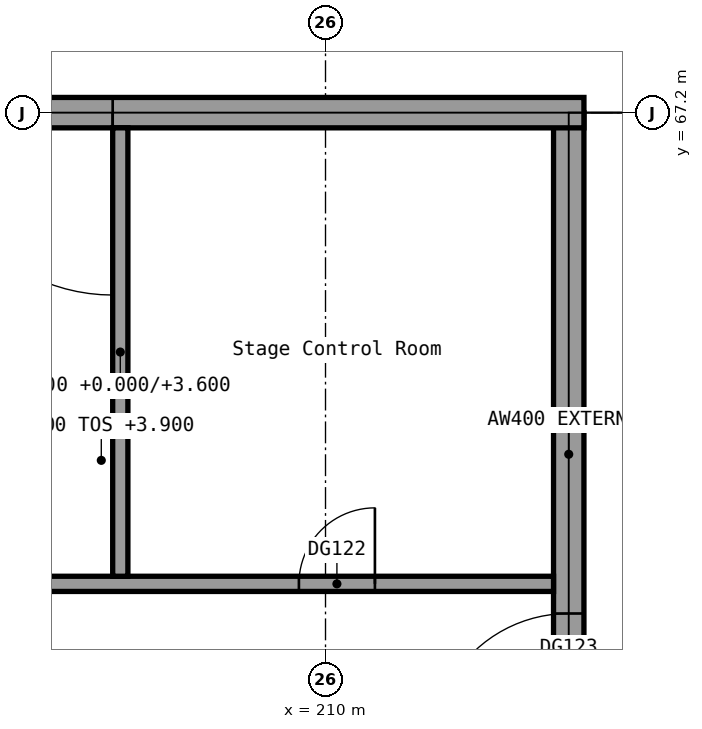
"""IFC4 building model, lengths in metres.
Left out: names, types, materials, properties, quantities, classifications, styles, units other than length and angle.
Written with IfcOpenShell. Run it as: python <this file> out.ifc"""

import sys

from ifc_helpers import new_model, si_unit, direction, frame, frame_2d, origin, place, context, subcontext, project, spatial, rectangle, extrude, element, fill, save


model = new_model("IFC4")
c1 = context("Model", 3, precision=1e-05, world=origin(), true_north=direction((0.0, 1.0)))
c2 = subcontext(c1, "Body", "Model", "MODEL_VIEW")
j1 = project(units=[si_unit("LENGTHUNIT", "METRE"), si_unit("PLANEANGLEUNIT", "RADIAN")], contexts=[c1])
p1 = place(None, origin())
s1 = spatial("IfcSite", under=j1, at=p1, CompositionType="ELEMENT")
p2 = place(p1, origin())
s2 = spatial("IfcBuilding", under=s1, at=p2, CompositionType="ELEMENT")
p3 = place(p2, origin())
s3 = spatial("IfcBuildingStorey", under=s2, at=p3, CompositionType="ELEMENT", Elevation=0.0)
p4 = place(p3, frame((213.2, 58.21, 0.0), z_axis=(0.0, 0.0, 1.0), x_axis=(0.0, 1.0, 0.0)))
e1 = element("IfcWall", 1, at=p4, inside=s3, PredefinedType="SHEAR", context=c2, shape_type="SweptSolid", body=[
    extrude(rectangle(XDim=8.99, YDim=0.4, at=frame_2d((4.495, 0.0))), origin(), (0.0, 0.0, 1.0), 6.0),
])
p5 = place(p4, frame((0.6, 0.0, 0.0)))
e2 = element("IfcOpeningElement", 2, at=p5, cuts=e1, PredefinedType="OPENING", context=c2, shape_type="SweptSolid", body=[
    extrude(rectangle(XDim=1.8, YDim=2.1, at=frame_2d((0.9, 1.05))), frame((0.0, 0.2, 0.0), z_axis=(0.0, -1.0, 0.0), x_axis=(1.0, 0.0, 0.0)), (0.0, 0.0, 1.0), 0.4),
])
p6 = place(p3, frame((213.4, 67.2, 0.0), z_axis=(0.0, 0.0, 1.0), x_axis=(-1.0, 0.0, 0.0)))
e3 = element("IfcWall", 3, at=p6, inside=s3, PredefinedType="SHEAR", context=c2, shape_type="SweptSolid", body=[
    extrude(rectangle(XDim=23.6, YDim=0.4, at=frame_2d((11.8, 0.0))), origin(), (0.0, 0.0, 1.0), 6.0),
])
p7 = place(p6, frame((6.2, 0.0, 0.0)))
e4 = element("IfcOpeningElement", 4, at=p7, cuts=e3, PredefinedType="OPENING", context=c2, shape_type="SweptSolid", body=[
    extrude(rectangle(XDim=2.4, YDim=2.4, at=frame_2d((1.2, 1.2))), frame((0.0, 0.2, 0.0), z_axis=(0.0, -1.0, 0.0), x_axis=(1.0, 0.0, 0.0)), (0.0, 0.0, 1.0), 0.4),
])
p8 = place(p3, frame((190.2, 61.0, 0.0), z_axis=(0.0, 0.0, 1.0), x_axis=(1.0, 0.0, 0.0)))
e5 = element("IfcWall", 5, at=p8, inside=s3, PredefinedType="SOLIDWALL", context=c2, shape_type="SweptSolid", body=[
    extrude(rectangle(XDim=22.8, YDim=0.2, at=frame_2d((11.4, 0.0))), origin(), (0.0, 0.0, 1.0), 3.6),
])
p9 = place(p8, frame((2.35, 0.0, 0.0)))
e6 = element("IfcOpeningElement", 6, at=p9, cuts=e5, PredefinedType="OPENING", context=c2, shape_type="SweptSolid", body=[
    extrude(rectangle(XDim=1.0, YDim=2.1, at=frame_2d((0.5, 1.05))), frame((0.0, 0.1, 0.0), z_axis=(0.0, -1.0, 0.0), x_axis=(1.0, 0.0, 0.0)), (0.0, 0.0, 1.0), 0.2),
])
p10 = place(p8, frame((8.05, 0.0, 0.0)))
e7 = element("IfcOpeningElement", 7, at=p10, cuts=e5, PredefinedType="OPENING", context=c2, shape_type="SweptSolid", body=[
    extrude(rectangle(XDim=1.0, YDim=2.1, at=frame_2d((0.5, 1.05))), frame((0.0, 0.1, 0.0), z_axis=(0.0, -1.0, 0.0), x_axis=(1.0, 0.0, 0.0)), (0.0, 0.0, 1.0), 0.2),
])
p11 = place(p8, frame((13.75, 0.0, 0.0)))
e8 = element("IfcOpeningElement", 8, at=p11, cuts=e5, PredefinedType="OPENING", context=c2, shape_type="SweptSolid", body=[
    extrude(rectangle(XDim=1.0, YDim=2.1, at=frame_2d((0.5, 1.05))), frame((0.0, 0.1, 0.0), z_axis=(0.0, -1.0, 0.0), x_axis=(1.0, 0.0, 0.0)), (0.0, 0.0, 1.0), 0.2),
])
p12 = place(p8, frame((19.45, 0.0, 0.0)))
e9 = element("IfcOpeningElement", 9, at=p12, cuts=e5, PredefinedType="OPENING", context=c2, shape_type="SweptSolid", body=[
    extrude(rectangle(XDim=1.0, YDim=2.1, at=frame_2d((0.5, 1.05))), frame((0.0, 0.1, 0.0), z_axis=(0.0, -1.0, 0.0), x_axis=(1.0, 0.0, 0.0)), (0.0, 0.0, 1.0), 0.2),
])
p13 = place(p3, frame((207.3, 61.1, 0.0), z_axis=(0.0, 0.0, 1.0), x_axis=(0.0, 1.0, 0.0)))
e10 = element("IfcWall", 10, at=p13, inside=s3, PredefinedType="SOLIDWALL", context=c2, shape_type="SweptSolid", body=[
    extrude(rectangle(XDim=5.9, YDim=0.2, at=frame_2d((2.95, 0.0))), origin(), (0.0, 0.0, 1.0), 3.6),
])
p14 = place(p12, origin())
e11 = element("IfcDoor", 11, at=p14, inside=s3, OperationType="SINGLE_SWING_RIGHT", PredefinedType="DOOR", context=c2, shape_type="SweptSolid", body=[
    extrude(rectangle(XDim=1.0, YDim=2.1, at=frame_2d((0.5, 1.05))), frame((0.0, 0.025, 0.0), z_axis=(0.0, -1.0, 0.0), x_axis=(1.0, 0.0, 0.0)), (0.0, 0.0, 1.0), 0.05),
])
fill(e9, e11)
p15 = place(p5, origin())
e12 = element("IfcDoor", 12, at=p15, inside=s3, OperationType="DOUBLE_DOOR_SINGLE_SWING", PredefinedType="DOOR", context=c2, shape_type="SweptSolid", body=[
    extrude(rectangle(XDim=1.8, YDim=2.1, at=frame_2d((0.9, 1.05))), frame((0.0, 0.025, 0.0), z_axis=(0.0, -1.0, 0.0), x_axis=(1.0, 0.0, 0.0)), (0.0, 0.0, 1.0), 0.05),
])
fill(e2, e12)
p16 = place(p7, origin())
e13 = element("IfcDoor", 13, at=p16, inside=s3, OperationType="DOUBLE_DOOR_SINGLE_SWING", PredefinedType="DOOR", context=c2, shape_type="SweptSolid", body=[
    extrude(rectangle(XDim=2.4, YDim=2.4, at=frame_2d((1.2, 1.2))), frame((0.0, 0.025, 0.0), z_axis=(0.0, -1.0, 0.0), x_axis=(1.0, 0.0, 0.0)), (0.0, 0.0, 1.0), 0.05),
])
fill(e4, e13)
save(model, sys.argv[1])
